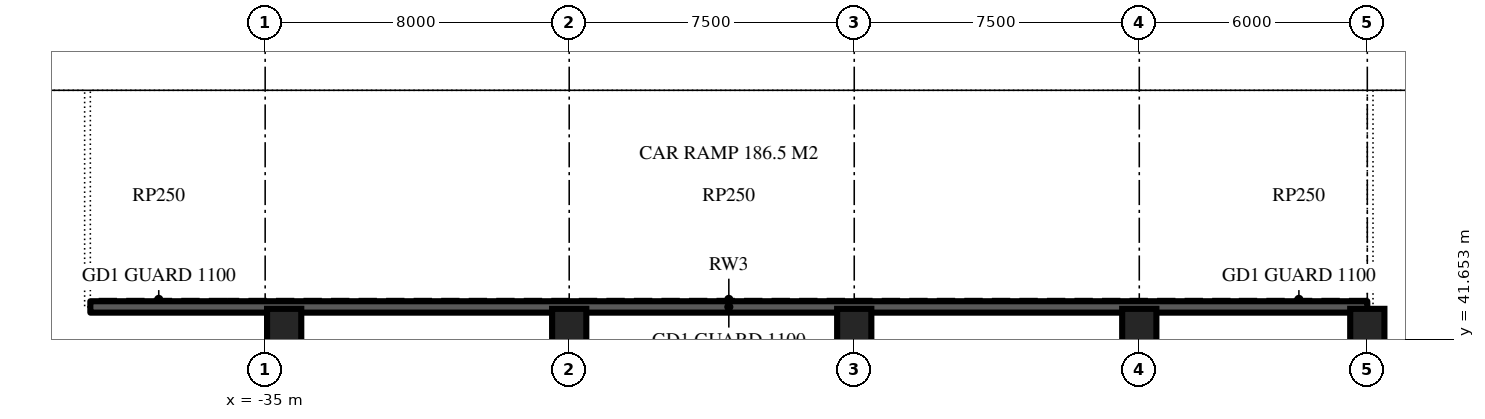
"""IFC4 building model, lengths in metres.
Left out: names, types, materials, properties, quantities, classifications, styles, units other than length and angle.
Written with IfcOpenShell. Run it as: python <this file> out.ifc"""

import sys

from ifc_helpers import new_model, si_unit, direction, frame, frame_2d, origin, origin_2d, place, context, subcontext, project, spatial, rectangle, extrude, element, save


model = new_model("IFC4")
c1 = context("Model", 3, precision=1e-05, world=origin(), true_north=direction((0.0, 1.0)))
c2 = subcontext(c1, "Body", "Model", "MODEL_VIEW")
j1 = project(units=[si_unit("LENGTHUNIT", "METRE"), si_unit("PLANEANGLEUNIT", "RADIAN")], contexts=[c1])
p1 = place(None, origin())
s1 = spatial("IfcSite", under=j1, at=p1, CompositionType="ELEMENT")
p2 = place(p1, origin())
s2 = spatial("IfcBuilding", under=s1, at=p2, CompositionType="ELEMENT")
p3 = place(p2, frame((0.0, 0.0, -10.0)))
s3 = spatial("IfcBuildingStorey", under=s2, at=p3, CompositionType="ELEMENT", Elevation=-10.0)
p4 = place(p3, frame((-48.8, 48.5, -0.5), z_axis=(0.0, 0.0, 1.0), x_axis=(1.0, 0.0, 0.0)))
e1 = element("IfcWall", 1, at=p4, inside=s3, PredefinedType="SOLIDWALL", context=c2, shape_type="SweptSolid", body=[
    extrude(rectangle(XDim=97.6, YDim=0.6, at=frame_2d((48.8, 0.0))), origin(), (0.0, 0.0, 1.0), 10.1),
])
p5 = place(p2, frame((0.0, 0.0, -5.0)))
s4 = spatial("IfcBuildingStorey", under=s2, at=p5, CompositionType="ELEMENT", Elevation=-5.0)
for number, where, z_axis, x_axis in (
    (2, (-34.5, 42.0, 0.0), (0.0, 0.0, 1.0), (1.0, 0.0, 0.0)),
    (3, (-27.0, 42.0, 0.0), (0.0, 0.0, 1.0), (1.0, 0.0, 0.0)),
    (4, (-19.5, 42.0, 0.0), (0.0, 0.0, 1.0), (1.0, 0.0, 0.0)),
    (5, (-12.0, 42.0, 0.0), (0.0, 0.0, 1.0), (1.0, 0.0, 0.0)),
    (6, (-6.0, 42.0, 0.0), (0.0, 0.0, 1.0), (1.0, 0.0, 0.0)),
):
    element("IfcColumn", number, at=place(p5, frame(where, z_axis=z_axis, x_axis=x_axis)), inside=s4, PredefinedType="COLUMN", context=c2, shape_type="SweptSolid", body=[
        extrude(rectangle(XDim=0.9, YDim=0.9, at=origin_2d()), origin(), (0.0, 0.0, 1.0), 4.6),
    ])
p6 = place(p5, frame((-39.6, 42.5, 0.0), z_axis=(0.0, 0.0, 1.0), x_axis=(1.0, 0.0, 0.0)))
e7 = element("IfcWall", 7, at=p6, inside=s4, PredefinedType="SOLIDWALL", context=c2, shape_type="SweptSolid", body=[
    extrude(rectangle(XDim=33.6, YDim=0.3, at=frame_2d((16.8, 0.0))), origin(), (0.0, 0.0, 1.0), 4.6),
])
save(model, sys.argv[1])
